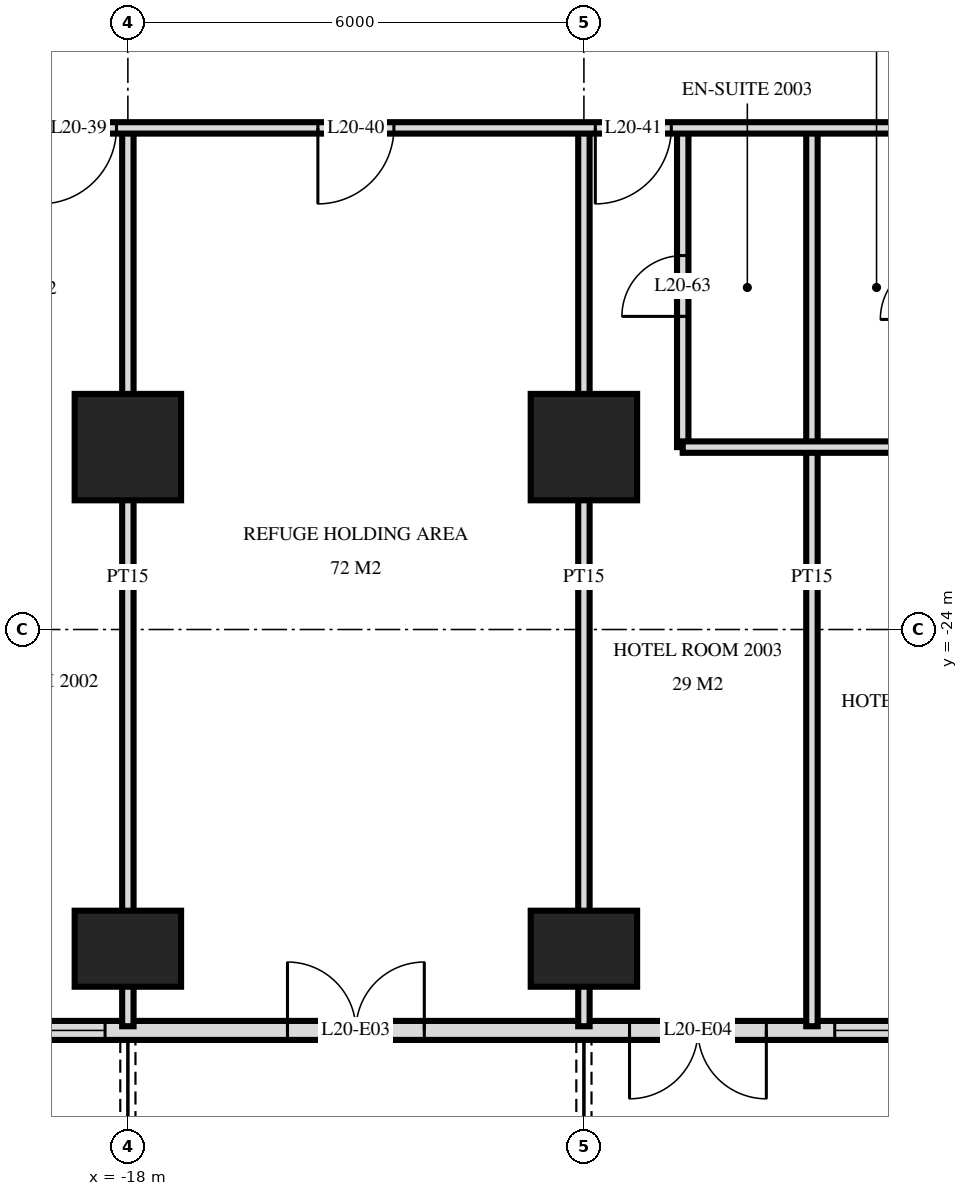
"""IFC4 building model, lengths in metres.
Left out: names, types, materials, properties, quantities, classifications, styles, units other than length and angle.
Written with IfcOpenShell. Run it as: python <this file> out.ifc"""

import sys

from ifc_helpers import new_model, si_unit, direction, frame, frame_2d, origin, origin_2d, place, context, subcontext, project, spatial, rectangle, extrude, element, fill, save


model = new_model("IFC4")
c1 = context("Model", 3, precision=1e-05, world=origin(), true_north=direction((0.0, 1.0)))
c2 = subcontext(c1, "Body", "Model", "MODEL_VIEW")
j1 = project(units=[si_unit("LENGTHUNIT", "METRE"), si_unit("PLANEANGLEUNIT", "RADIAN")], contexts=[c1])
p1 = place(None, origin())
s1 = spatial("IfcSite", under=j1, at=p1, CompositionType="ELEMENT")
p2 = place(p1, origin())
s2 = spatial("IfcBuilding", under=s1, at=p2, CompositionType="ELEMENT")
p3 = place(p2, frame((0.0, 0.0, 81.6)))
s3 = spatial("IfcBuildingStorey", under=s2, at=p3, CompositionType="ELEMENT", Elevation=81.6)
p4 = place(p3, frame((-18.0, -28.2, 0.0), z_axis=(0.0, 0.0, 1.0), x_axis=(1.0, 0.0, 0.0)))
e1 = element("IfcColumn", 1, at=p4, inside=s3, PredefinedType="COLUMN", context=c2, shape_type="SweptSolid", body=[
    extrude(rectangle(XDim=1.4, YDim=1.0, at=origin_2d()), origin(), (0.0, 0.0, 1.0), 3.6),
])
p5 = place(p3, frame((-18.0, -21.6, 0.0), z_axis=(0.0, 0.0, 1.0), x_axis=(1.0, 0.0, 0.0)))
e2 = element("IfcColumn", 2, at=p5, inside=s3, PredefinedType="COLUMN", context=c2, shape_type="SweptSolid", body=[
    extrude(rectangle(XDim=1.4, YDim=1.4, at=origin_2d()), origin(), (0.0, 0.0, 1.0), 3.6),
])
p6 = place(p3, frame((-12.0, -28.2, 0.0), z_axis=(0.0, 0.0, 1.0), x_axis=(1.0, 0.0, 0.0)))
e3 = element("IfcColumn", 3, at=p6, inside=s3, PredefinedType="COLUMN", context=c2, shape_type="SweptSolid", body=[
    extrude(rectangle(XDim=1.4, YDim=1.0, at=origin_2d()), origin(), (0.0, 0.0, 1.0), 3.6),
])
p7 = place(p3, frame((-12.0, -21.6, 0.0), z_axis=(0.0, 0.0, 1.0), x_axis=(1.0, 0.0, 0.0)))
e4 = element("IfcColumn", 4, at=p7, inside=s3, PredefinedType="COLUMN", context=c2, shape_type="SweptSolid", body=[
    extrude(rectangle(XDim=1.4, YDim=1.4, at=origin_2d()), origin(), (0.0, 0.0, 1.0), 3.6),
])
p8 = place(p3, frame((-28.775, -29.275, 0.0), z_axis=(0.0, 0.0, 1.0), x_axis=(1.0, 0.0, 0.0)))
e5 = element("IfcWall", 5, at=p8, inside=s3, PredefinedType="SOLIDWALL", context=c2, shape_type="SweptSolid", body=[
    extrude(rectangle(XDim=57.551, YDim=0.25, at=frame_2d((28.775, 0.0))), origin(), (0.0, 0.0, 1.0), 3.32),
])
p9 = place(p8, frame((0.575, 0.0, 0.0)))
e6 = element("IfcOpeningElement", 6, at=p9, cuts=e5, PredefinedType="OPENING", context=c2, shape_type="SweptSolid", body=[
    extrude(rectangle(XDim=1.8, YDim=2.4, at=frame_2d((0.9, 1.2))), frame((0.0, 0.135, 0.0), z_axis=(0.0, -1.0, 0.0), x_axis=(1.0, 0.0, 0.0)), (0.0, 0.0, 1.0), 0.27),
])
p10 = place(p8, frame((5.375, 0.0, 0.0)))
e7 = element("IfcOpeningElement", 7, at=p10, cuts=e5, PredefinedType="OPENING", context=c2, shape_type="SweptSolid", body=[
    extrude(rectangle(XDim=1.8, YDim=2.4, at=frame_2d((0.9, 1.2))), frame((0.0, 0.135, 0.0), z_axis=(0.0, -1.0, 0.0), x_axis=(1.0, 0.0, 0.0)), (0.0, 0.0, 1.0), 0.27),
])
p11 = place(p8, frame((8.075, 0.0, 0.3)))
e8 = element("IfcOpeningElement", 8, at=p11, cuts=e5, PredefinedType="OPENING", context=c2, shape_type="SweptSolid", body=[
    extrude(rectangle(XDim=2.4, YDim=2.1, at=frame_2d((1.2, 1.05))), frame((0.0, 0.135, 0.0), z_axis=(0.0, -1.0, 0.0), x_axis=(1.0, 0.0, 0.0)), (0.0, 0.0, 1.0), 0.27),
])
p12 = place(p8, frame((12.875, 0.0, 0.0)))
e9 = element("IfcOpeningElement", 9, at=p12, cuts=e5, PredefinedType="OPENING", context=c2, shape_type="SweptSolid", body=[
    extrude(rectangle(XDim=1.8, YDim=2.4, at=frame_2d((0.9, 1.2))), frame((0.0, 0.135, 0.0), z_axis=(0.0, -1.0, 0.0), x_axis=(1.0, 0.0, 0.0)), (0.0, 0.0, 1.0), 0.27),
])
p13 = place(p8, frame((17.375, 0.0, 0.0)))
e10 = element("IfcOpeningElement", 10, at=p13, cuts=e5, PredefinedType="OPENING", context=c2, shape_type="SweptSolid", body=[
    extrude(rectangle(XDim=1.8, YDim=2.4, at=frame_2d((0.9, 1.2))), frame((0.0, 0.135, 0.0), z_axis=(0.0, -1.0, 0.0), x_axis=(1.0, 0.0, 0.0)), (0.0, 0.0, 1.0), 0.27),
])
p14 = place(p8, frame((20.075, 0.0, 0.3)))
e11 = element("IfcOpeningElement", 11, at=p14, cuts=e5, PredefinedType="OPENING", context=c2, shape_type="SweptSolid", body=[
    extrude(rectangle(XDim=2.4, YDim=2.1, at=frame_2d((1.2, 1.05))), frame((0.0, 0.135, 0.0), z_axis=(0.0, -1.0, 0.0), x_axis=(1.0, 0.0, 0.0)), (0.0, 0.0, 1.0), 0.27),
])
p15 = place(p8, frame((23.075, 0.0, 0.3)))
e12 = element("IfcOpeningElement", 12, at=p15, cuts=e5, PredefinedType="OPENING", context=c2, shape_type="SweptSolid", body=[
    extrude(rectangle(XDim=2.4, YDim=2.1, at=frame_2d((1.2, 1.05))), frame((0.0, 0.135, 0.0), z_axis=(0.0, -1.0, 0.0), x_axis=(1.0, 0.0, 0.0)), (0.0, 0.0, 1.0), 0.27),
])
p16 = place(p8, frame((26.375, 0.0, 0.0)))
e13 = element("IfcOpeningElement", 13, at=p16, cuts=e5, PredefinedType="OPENING", context=c2, shape_type="SweptSolid", body=[
    extrude(rectangle(XDim=1.8, YDim=2.4, at=frame_2d((0.9, 1.2))), frame((0.0, 0.135, 0.0), z_axis=(0.0, -1.0, 0.0), x_axis=(1.0, 0.0, 0.0)), (0.0, 0.0, 1.0), 0.27),
])
p17 = place(p8, frame((29.075, 0.0, 0.3)))
e14 = element("IfcOpeningElement", 14, at=p17, cuts=e5, PredefinedType="OPENING", context=c2, shape_type="SweptSolid", body=[
    extrude(rectangle(XDim=2.4, YDim=2.1, at=frame_2d((1.2, 1.05))), frame((0.0, 0.135, 0.0), z_axis=(0.0, -1.0, 0.0), x_axis=(1.0, 0.0, 0.0)), (0.0, 0.0, 1.0), 0.27),
])
p18 = place(p8, frame((32.375, 0.0, 0.0)))
e15 = element("IfcOpeningElement", 15, at=p18, cuts=e5, PredefinedType="OPENING", context=c2, shape_type="SweptSolid", body=[
    extrude(rectangle(XDim=1.8, YDim=2.4, at=frame_2d((0.9, 1.2))), frame((0.0, 0.135, 0.0), z_axis=(0.0, -1.0, 0.0), x_axis=(1.0, 0.0, 0.0)), (0.0, 0.0, 1.0), 0.27),
])
p19 = place(p8, frame((35.375, 0.0, 0.0)))
e16 = element("IfcOpeningElement", 16, at=p19, cuts=e5, PredefinedType="OPENING", context=c2, shape_type="SweptSolid", body=[
    extrude(rectangle(XDim=1.8, YDim=2.4, at=frame_2d((0.9, 1.2))), frame((0.0, 0.135, 0.0), z_axis=(0.0, -1.0, 0.0), x_axis=(1.0, 0.0, 0.0)), (0.0, 0.0, 1.0), 0.27),
])
p20 = place(p8, frame((38.075, 0.0, 0.3)))
e17 = element("IfcOpeningElement", 17, at=p20, cuts=e5, PredefinedType="OPENING", context=c2, shape_type="SweptSolid", body=[
    extrude(rectangle(XDim=2.4, YDim=2.1, at=frame_2d((1.2, 1.05))), frame((0.0, 0.135, 0.0), z_axis=(0.0, -1.0, 0.0), x_axis=(1.0, 0.0, 0.0)), (0.0, 0.0, 1.0), 0.27),
])
p21 = place(p8, frame((41.375, 0.0, 0.0)))
e18 = element("IfcOpeningElement", 18, at=p21, cuts=e5, PredefinedType="OPENING", context=c2, shape_type="SweptSolid", body=[
    extrude(rectangle(XDim=1.8, YDim=2.4, at=frame_2d((0.9, 1.2))), frame((0.0, 0.135, 0.0), z_axis=(0.0, -1.0, 0.0), x_axis=(1.0, 0.0, 0.0)), (0.0, 0.0, 1.0), 0.27),
])
p22 = place(p8, frame((44.075, 0.0, 0.3)))
e19 = element("IfcOpeningElement", 19, at=p22, cuts=e5, PredefinedType="OPENING", context=c2, shape_type="SweptSolid", body=[
    extrude(rectangle(XDim=2.4, YDim=2.1, at=frame_2d((1.2, 1.05))), frame((0.0, 0.135, 0.0), z_axis=(0.0, -1.0, 0.0), x_axis=(1.0, 0.0, 0.0)), (0.0, 0.0, 1.0), 0.27),
])
p23 = place(p8, frame((47.075, 0.0, 0.3)))
e20 = element("IfcOpeningElement", 20, at=p23, cuts=e5, PredefinedType="OPENING", context=c2, shape_type="SweptSolid", body=[
    extrude(rectangle(XDim=2.4, YDim=2.1, at=frame_2d((1.2, 1.05))), frame((0.0, 0.135, 0.0), z_axis=(0.0, -1.0, 0.0), x_axis=(1.0, 0.0, 0.0)), (0.0, 0.0, 1.0), 0.27),
])
p24 = place(p8, frame((50.375, 0.0, 0.0)))
e21 = element("IfcOpeningElement", 21, at=p24, cuts=e5, PredefinedType="OPENING", context=c2, shape_type="SweptSolid", body=[
    extrude(rectangle(XDim=1.8, YDim=2.4, at=frame_2d((0.9, 1.2))), frame((0.0, 0.135, 0.0), z_axis=(0.0, -1.0, 0.0), x_axis=(1.0, 0.0, 0.0)), (0.0, 0.0, 1.0), 0.27),
])
p25 = place(p8, frame((53.375, 0.0, 0.0)))
e22 = element("IfcOpeningElement", 22, at=p25, cuts=e5, PredefinedType="OPENING", context=c2, shape_type="SweptSolid", body=[
    extrude(rectangle(XDim=1.8, YDim=2.4, at=frame_2d((0.9, 1.2))), frame((0.0, 0.135, 0.0), z_axis=(0.0, -1.0, 0.0), x_axis=(1.0, 0.0, 0.0)), (0.0, 0.0, 1.0), 0.27),
])
p26 = place(p3, frame((-9.0, -29.22, 0.0), z_axis=(0.0, 0.0, 1.0), x_axis=(0.0, 1.0, 0.0)))
e23 = element("IfcWall", 23, at=p26, inside=s3, PredefinedType="PARTITIONING", context=c2, shape_type="SweptSolid", body=[
    extrude(rectangle(XDim=11.82, YDim=0.15, at=frame_2d((5.91, 0.0))), origin(), (0.0, 0.0, 1.0), 3.32),
])
p27 = place(p3, frame((-10.7, -21.6, 0.0), z_axis=(0.0, 0.0, 1.0), x_axis=(0.0, 1.0, 0.0)))
e24 = element("IfcWall", 24, at=p27, inside=s3, PredefinedType="PARTITIONING", context=c2, shape_type="SweptSolid", body=[
    extrude(rectangle(XDim=4.2, YDim=0.15, at=frame_2d((2.1, 0.0))), origin(), (0.0, 0.0, 1.0), 3.32),
])
p28 = place(p27, frame((1.72, 0.0, 0.0)))
e25 = element("IfcOpeningElement", 25, at=p28, cuts=e24, PredefinedType="OPENING", context=c2, shape_type="SweptSolid", body=[
    extrude(rectangle(XDim=0.8, YDim=2.1, at=frame_2d((0.4, 1.05))), frame((0.0, 0.085, 0.0), z_axis=(0.0, -1.0, 0.0), x_axis=(1.0, 0.0, 0.0)), (0.0, 0.0, 1.0), 0.17),
])
for number, where, z_axis, x_axis in (
    (26, (-12.0, -29.22, 0.0), (0.0, 0.0, 1.0), (0.0, 1.0, 0.0)),
    (27, (-18.0, -29.22, 0.0), (0.0, 0.0, 1.0), (0.0, 1.0, 0.0)),
):
    element("IfcWall", number, at=place(p3, frame(where, z_axis=z_axis, x_axis=x_axis)), inside=s3, PredefinedType="PARTITIONING", context=c2, shape_type="SweptSolid", body=[
        extrude(rectangle(XDim=11.82, YDim=0.15, at=frame_2d((5.91, 0.0))), origin(), (0.0, 0.0, 1.0), 3.32),
    ])
p29 = place(p3, frame((-10.7, -21.6, 0.0), z_axis=(0.0, 0.0, 1.0), x_axis=(1.0, 0.0, 0.0)))
e28 = element("IfcWall", 28, at=p29, inside=s3, PredefinedType="PARTITIONING", context=c2, shape_type="SweptSolid", body=[
    extrude(rectangle(XDim=3.4, YDim=0.15, at=frame_2d((1.7, 0.0))), origin(), (0.0, 0.0, 1.0), 3.32),
])
p30 = place(p3, frame((-33.12, -17.4, 0.0), z_axis=(0.0, 0.0, 1.0), x_axis=(1.0, 0.0, 0.0)))
e29 = element("IfcWall", 29, at=p30, inside=s3, PredefinedType="PARTITIONING", context=c2, shape_type="SweptSolid", body=[
    extrude(rectangle(XDim=66.24, YDim=0.15, at=frame_2d((33.12, 0.0))), origin(), (0.0, 0.0, 1.0), 3.32),
])
p31 = place(p30, frame((9.27, 0.0, 0.0)))
e30 = element("IfcOpeningElement", 30, at=p31, cuts=e29, PredefinedType="OPENING", context=c2, shape_type="SweptSolid", body=[
    extrude(rectangle(XDim=1.0, YDim=2.1, at=frame_2d((0.5, 1.05))), frame((0.0, 0.085, 0.0), z_axis=(0.0, -1.0, 0.0), x_axis=(1.0, 0.0, 0.0)), (0.0, 0.0, 1.0), 0.17),
])
p32 = place(p30, frame((13.97, 0.0, 0.0)))
e31 = element("IfcOpeningElement", 31, at=p32, cuts=e29, PredefinedType="OPENING", context=c2, shape_type="SweptSolid", body=[
    extrude(rectangle(XDim=1.0, YDim=2.1, at=frame_2d((0.5, 1.05))), frame((0.0, 0.085, 0.0), z_axis=(0.0, -1.0, 0.0), x_axis=(1.0, 0.0, 0.0)), (0.0, 0.0, 1.0), 0.17),
])
p33 = place(p30, frame((17.62, 0.0, 0.0)))
e32 = element("IfcOpeningElement", 32, at=p33, cuts=e29, PredefinedType="OPENING", context=c2, shape_type="SweptSolid", body=[
    extrude(rectangle(XDim=1.0, YDim=2.1, at=frame_2d((0.5, 1.05))), frame((0.0, 0.085, 0.0), z_axis=(0.0, -1.0, 0.0), x_axis=(1.0, 0.0, 0.0)), (0.0, 0.0, 1.0), 0.17),
])
p34 = place(p30, frame((21.27, 0.0, 0.0)))
e33 = element("IfcOpeningElement", 33, at=p34, cuts=e29, PredefinedType="OPENING", context=c2, shape_type="SweptSolid", body=[
    extrude(rectangle(XDim=1.0, YDim=2.1, at=frame_2d((0.5, 1.05))), frame((0.0, 0.085, 0.0), z_axis=(0.0, -1.0, 0.0), x_axis=(1.0, 0.0, 0.0)), (0.0, 0.0, 1.0), 0.17),
])
p35 = place(p30, frame((25.97, 0.0, 0.0)))
e34 = element("IfcOpeningElement", 34, at=p35, cuts=e29, PredefinedType="OPENING", context=c2, shape_type="SweptSolid", body=[
    extrude(rectangle(XDim=1.0, YDim=2.1, at=frame_2d((0.5, 1.05))), frame((0.0, 0.085, 0.0), z_axis=(0.0, -1.0, 0.0), x_axis=(1.0, 0.0, 0.0)), (0.0, 0.0, 1.0), 0.17),
])
p36 = place(p30, frame((35.62, 0.0, 0.0)))
e35 = element("IfcOpeningElement", 35, at=p36, cuts=e29, PredefinedType="OPENING", context=c2, shape_type="SweptSolid", body=[
    extrude(rectangle(XDim=1.0, YDim=2.1, at=frame_2d((0.5, 1.05))), frame((0.0, 0.085, 0.0), z_axis=(0.0, -1.0, 0.0), x_axis=(1.0, 0.0, 0.0)), (0.0, 0.0, 1.0), 0.17),
])
p37 = place(p30, frame((40.97, 0.0, 0.0)))
e36 = element("IfcOpeningElement", 36, at=p37, cuts=e29, PredefinedType="OPENING", context=c2, shape_type="SweptSolid", body=[
    extrude(rectangle(XDim=1.0, YDim=2.1, at=frame_2d((0.5, 1.05))), frame((0.0, 0.085, 0.0), z_axis=(0.0, -1.0, 0.0), x_axis=(1.0, 0.0, 0.0)), (0.0, 0.0, 1.0), 0.17),
])
p38 = place(p30, frame((42.27, 0.0, 0.0)))
e37 = element("IfcOpeningElement", 37, at=p38, cuts=e29, PredefinedType="OPENING", context=c2, shape_type="SweptSolid", body=[
    extrude(rectangle(XDim=1.0, YDim=2.1, at=frame_2d((0.5, 1.05))), frame((0.0, 0.085, 0.0), z_axis=(0.0, -1.0, 0.0), x_axis=(1.0, 0.0, 0.0)), (0.0, 0.0, 1.0), 0.17),
])
p39 = place(p30, frame((46.97, 0.0, 0.0)))
e38 = element("IfcOpeningElement", 38, at=p39, cuts=e29, PredefinedType="OPENING", context=c2, shape_type="SweptSolid", body=[
    extrude(rectangle(XDim=1.0, YDim=2.1, at=frame_2d((0.5, 1.05))), frame((0.0, 0.085, 0.0), z_axis=(0.0, -1.0, 0.0), x_axis=(1.0, 0.0, 0.0)), (0.0, 0.0, 1.0), 0.17),
])
p40 = place(p30, frame((48.27, 0.0, 0.0)))
e39 = element("IfcOpeningElement", 39, at=p40, cuts=e29, PredefinedType="OPENING", context=c2, shape_type="SweptSolid", body=[
    extrude(rectangle(XDim=1.0, YDim=2.1, at=frame_2d((0.5, 1.05))), frame((0.0, 0.085, 0.0), z_axis=(0.0, -1.0, 0.0), x_axis=(1.0, 0.0, 0.0)), (0.0, 0.0, 1.0), 0.17),
])
p41 = place(p30, frame((1.87, 0.0, 0.0)))
e40 = element("IfcOpeningElement", 40, at=p41, cuts=e29, PredefinedType="OPENING", context=c2, shape_type="SweptSolid", body=[
    extrude(rectangle(XDim=1.0, YDim=2.1, at=frame_2d((0.5, 1.05))), frame((0.0, 0.085, 0.0), z_axis=(0.0, -1.0, 0.0), x_axis=(1.0, 0.0, 0.0)), (0.0, 0.0, 1.0), 0.17),
])
p42 = place(p30, frame((60.37, 0.0, 0.0)))
e41 = element("IfcOpeningElement", 41, at=p42, cuts=e29, PredefinedType="OPENING", context=c2, shape_type="SweptSolid", body=[
    extrude(rectangle(XDim=1.0, YDim=2.1, at=frame_2d((0.5, 1.05))), frame((0.0, 0.085, 0.0), z_axis=(0.0, -1.0, 0.0), x_axis=(1.0, 0.0, 0.0)), (0.0, 0.0, 1.0), 0.17),
])
p43 = place(p11, origin())
e42 = element("IfcWindow", 42, at=p43, inside=s3, PartitioningType="SINGLE_PANEL", PredefinedType="WINDOW", context=c2, shape_type="SweptSolid", body=[
    extrude(rectangle(XDim=2.4, YDim=2.1, at=frame_2d((1.2, 1.05))), frame((0.0, 0.03, 0.0), z_axis=(0.0, -1.0, 0.0), x_axis=(1.0, 0.0, 0.0)), (0.0, 0.0, 1.0), 0.06),
])
fill(e8, e42)
p44 = place(p12, origin())
e43 = element("IfcDoor", 43, at=p44, inside=s3, OperationType="DOUBLE_DOOR_SINGLE_SWING", PredefinedType="DOOR", context=c2, shape_type="SweptSolid", body=[
    extrude(rectangle(XDim=1.8, YDim=2.4, at=frame_2d((0.9, 1.2))), frame((0.0, 0.025, 0.0), z_axis=(0.0, -1.0, 0.0), x_axis=(1.0, 0.0, 0.0)), (0.0, 0.0, 1.0), 0.05),
])
fill(e9, e43)
p45 = place(p13, frame((0.9, 0.0, 0.0), z_axis=(0.0, 0.0, 1.0), x_axis=(-1.0, 0.0, 0.0)))
e44 = element("IfcDoor", 44, at=p45, inside=s3, OperationType="DOUBLE_DOOR_SINGLE_SWING", PredefinedType="DOOR", context=c2, shape_type="SweptSolid", body=[
    extrude(rectangle(XDim=1.8, YDim=2.4, at=frame_2d((0.0, 1.2))), frame((0.0, -0.025, 0.0), z_axis=(0.0, 1.0, 0.0), x_axis=(-1.0, 0.0, 0.0)), (0.0, 0.0, 1.0), 0.05),
])
fill(e10, e44)
p46 = place(p14, origin())
e45 = element("IfcWindow", 45, at=p46, inside=s3, PartitioningType="SINGLE_PANEL", PredefinedType="WINDOW", context=c2, shape_type="SweptSolid", body=[
    extrude(rectangle(XDim=2.4, YDim=2.1, at=frame_2d((1.2, 1.05))), frame((0.0, 0.03, 0.0), z_axis=(0.0, -1.0, 0.0), x_axis=(1.0, 0.0, 0.0)), (0.0, 0.0, 1.0), 0.06),
])
fill(e11, e45)
p47 = place(p32, frame((0.5, 0.0, 0.0), z_axis=(0.0, 0.0, 1.0), x_axis=(-1.0, 0.0, 0.0)))
e46 = element("IfcDoor", 46, at=p47, inside=s3, OperationType="SINGLE_SWING_LEFT", PredefinedType="DOOR", context=c2, shape_type="SweptSolid", body=[
    extrude(rectangle(XDim=1.0, YDim=2.1, at=frame_2d((0.0, 1.05))), frame((0.0, -0.025, 0.0), z_axis=(0.0, 1.0, 0.0), x_axis=(-1.0, 0.0, 0.0)), (0.0, 0.0, 1.0), 0.05),
])
fill(e31, e46)
p48 = place(p33, frame((0.5, 0.0, 0.0), z_axis=(0.0, 0.0, 1.0), x_axis=(-1.0, 0.0, 0.0)))
e47 = element("IfcDoor", 47, at=p48, inside=s3, OperationType="SINGLE_SWING_LEFT", PredefinedType="DOOR", context=c2, shape_type="SweptSolid", body=[
    extrude(rectangle(XDim=1.0, YDim=2.1, at=frame_2d((0.0, 1.05))), frame((0.0, -0.025, 0.0), z_axis=(0.0, 1.0, 0.0), x_axis=(-1.0, 0.0, 0.0)), (0.0, 0.0, 1.0), 0.05),
])
fill(e32, e47)
p49 = place(p34, frame((0.5, 0.0, 0.0), z_axis=(0.0, 0.0, 1.0), x_axis=(-1.0, 0.0, 0.0)))
e48 = element("IfcDoor", 48, at=p49, inside=s3, OperationType="SINGLE_SWING_LEFT", PredefinedType="DOOR", context=c2, shape_type="SweptSolid", body=[
    extrude(rectangle(XDim=1.0, YDim=2.1, at=frame_2d((0.0, 1.05))), frame((0.0, -0.025, 0.0), z_axis=(0.0, 1.0, 0.0), x_axis=(-1.0, 0.0, 0.0)), (0.0, 0.0, 1.0), 0.05),
])
fill(e33, e48)
p50 = place(p28, origin())
e49 = element("IfcDoor", 49, at=p50, inside=s3, OperationType="SINGLE_SWING_RIGHT", PredefinedType="DOOR", context=c2, shape_type="SweptSolid", body=[
    extrude(rectangle(XDim=0.8, YDim=2.1, at=frame_2d((0.4, 1.05))), frame((0.0, 0.025, 0.0), z_axis=(0.0, -1.0, 0.0), x_axis=(1.0, 0.0, 0.0)), (0.0, 0.0, 1.0), 0.05),
])
fill(e25, e49)
save(model, sys.argv[1])
